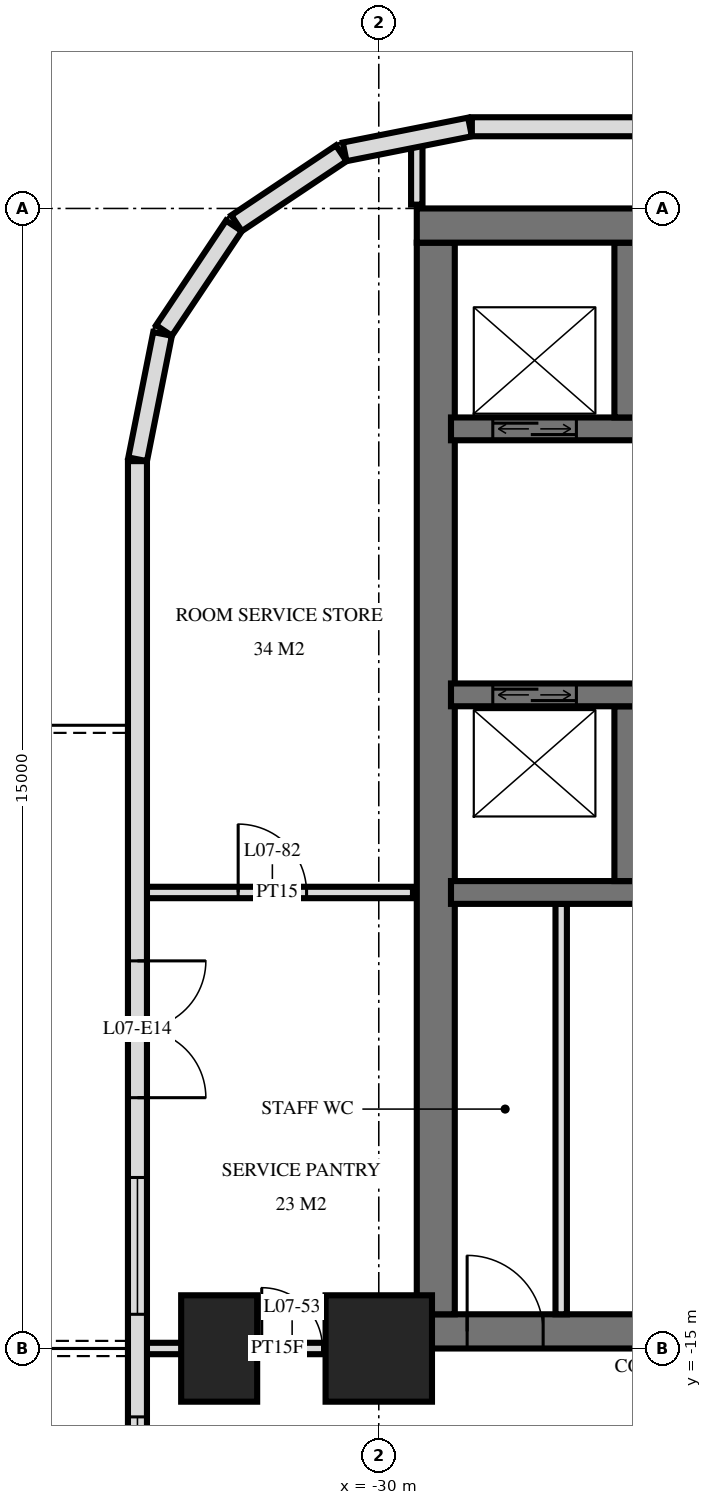
"""IFC4 building model, lengths in metres.
Left out: names, types, materials, properties, quantities, classifications, styles, units other than length and angle.
Written with IfcOpenShell. Run it as: python <this file> out.ifc"""

import sys

from ifc_helpers import new_model, si_unit, direction, frame, frame_2d, origin, origin_2d, place, context, subcontext, project, spatial, rectangle, extrude, element, fill, save


model = new_model("IFC4")
c1 = context("Model", 3, precision=1e-05, world=origin(), true_north=direction((0.0, 1.0)))
c2 = subcontext(c1, "Body", "Model", "MODEL_VIEW")
j1 = project(units=[si_unit("LENGTHUNIT", "METRE"), si_unit("PLANEANGLEUNIT", "RADIAN")], contexts=[c1])
p1 = place(None, origin())
s1 = spatial("IfcSite", under=j1, at=p1, CompositionType="ELEMENT")
p2 = place(p1, origin())
s2 = spatial("IfcBuilding", under=s1, at=p2, CompositionType="ELEMENT")
p3 = place(p2, frame((0.0, 0.0, 34.8)))
s3 = spatial("IfcBuildingStorey", under=s2, at=p3, CompositionType="ELEMENT", Elevation=34.8)
p4 = place(p3, frame((-32.1, -15.0, 0.0), z_axis=(0.0, 0.0, 1.0), x_axis=(0.0, 1.0, 0.0)))
e1 = element("IfcColumn", 1, at=p4, inside=s3, PredefinedType="COLUMN", context=c2, shape_type="SweptSolid", body=[
    extrude(rectangle(XDim=1.4, YDim=1.0, at=origin_2d()), origin(), (0.0, 0.0, 1.0), 3.6),
])
p5 = place(p3, frame((-30.0, -15.0, 0.0), z_axis=(0.0, 0.0, 1.0), x_axis=(1.0, 0.0, 0.0)))
e2 = element("IfcColumn", 2, at=p5, inside=s3, PredefinedType="COLUMN", context=c2, shape_type="SweptSolid", body=[
    extrude(rectangle(XDim=1.4, YDim=1.4, at=origin_2d()), origin(), (0.0, 0.0, 1.0), 3.6),
])
p6 = place(p3, frame((-29.5, -0.225, 0.0), z_axis=(0.0, 0.0, 1.0), x_axis=(1.0, 0.0, 0.0)))
e3 = element("IfcWall", 3, at=p6, inside=s3, PredefinedType="SHEAR", context=c2, shape_type="SweptSolid", body=[
    extrude(rectangle(XDim=19.5, YDim=0.45, at=frame_2d((9.75, 0.0))), origin(), (0.0, 0.0, 1.0), 3.6),
])
p7 = place(p3, frame((-29.5, -14.775, 0.0), z_axis=(0.0, 0.0, 1.0), x_axis=(1.0, 0.0, 0.0)))
e4 = element("IfcWall", 4, at=p7, inside=s3, PredefinedType="SHEAR", context=c2, shape_type="SweptSolid", body=[
    extrude(rectangle(XDim=19.5, YDim=0.45, at=frame_2d((9.75, 0.0))), origin(), (0.0, 0.0, 1.0), 3.6),
])
p8 = place(p7, frame((11.2, 0.0, 0.0)))
e5 = element("IfcOpeningElement", 5, at=p8, cuts=e4, PredefinedType="OPENING", context=c2, shape_type="SweptSolid", body=[
    extrude(rectangle(XDim=1.2, YDim=2.1, at=frame_2d((0.6, 1.05))), frame((0.0, 0.235, 0.0), z_axis=(0.0, -1.0, 0.0), x_axis=(1.0, 0.0, 0.0)), (0.0, 0.0, 1.0), 0.47),
])
p9 = place(p7, frame((14.25, 0.0, 0.0)))
e6 = element("IfcOpeningElement", 6, at=p9, cuts=e4, PredefinedType="OPENING", context=c2, shape_type="SweptSolid", body=[
    extrude(rectangle(XDim=1.1, YDim=2.1, at=frame_2d((0.55, 1.05))), frame((0.0, 0.235, 0.0), z_axis=(0.0, -1.0, 0.0), x_axis=(1.0, 0.0, 0.0)), (0.0, 0.0, 1.0), 0.47),
])
p10 = place(p7, frame((8.5, 0.0, 0.0)))
e7 = element("IfcOpeningElement", 7, at=p10, cuts=e4, PredefinedType="OPENING", context=c2, shape_type="SweptSolid", body=[
    extrude(rectangle(XDim=0.9, YDim=2.1, at=frame_2d((0.45, 1.05))), frame((0.0, 0.235, 0.0), z_axis=(0.0, -1.0, 0.0), x_axis=(1.0, 0.0, 0.0)), (0.0, 0.0, 1.0), 0.47),
])
p11 = place(p7, frame((6.05, 0.0, 0.0)))
e8 = element("IfcOpeningElement", 8, at=p11, cuts=e4, PredefinedType="OPENING", context=c2, shape_type="SweptSolid", body=[
    extrude(rectangle(XDim=1.0, YDim=2.1, at=frame_2d((0.5, 1.05))), frame((0.0, 0.235, 0.0), z_axis=(0.0, -1.0, 0.0), x_axis=(1.0, 0.0, 0.0)), (0.0, 0.0, 1.0), 0.47),
])
p12 = place(p7, frame((2.988, 0.0, 0.0)))
e9 = element("IfcOpeningElement", 9, at=p12, cuts=e4, PredefinedType="OPENING", context=c2, shape_type="SweptSolid", body=[
    extrude(rectangle(XDim=1.0, YDim=2.1, at=frame_2d((0.5, 1.05))), frame((0.0, 0.235, 0.0), z_axis=(0.0, -1.0, 0.0), x_axis=(1.0, 0.0, 0.0)), (0.0, 0.0, 1.0), 0.47),
])
p13 = place(p7, frame((0.663, 0.0, 0.0)))
e10 = element("IfcOpeningElement", 10, at=p13, cuts=e4, PredefinedType="OPENING", context=c2, shape_type="SweptSolid", body=[
    extrude(rectangle(XDim=1.0, YDim=2.1, at=frame_2d((0.5, 1.05))), frame((0.0, 0.235, 0.0), z_axis=(0.0, -1.0, 0.0), x_axis=(1.0, 0.0, 0.0)), (0.0, 0.0, 1.0), 0.47),
])
p14 = place(p3, frame((-29.25, -14.55, 0.0), z_axis=(0.0, 0.0, 1.0), x_axis=(0.0, 1.0, 0.0)))
e11 = element("IfcWall", 11, at=p14, inside=s3, PredefinedType="SHEAR", context=c2, shape_type="SweptSolid", body=[
    extrude(rectangle(XDim=14.1, YDim=0.5, at=frame_2d((7.05, 0.0))), origin(), (0.0, 0.0, 1.0), 3.6),
])
p15 = place(p3, frame((-29.05, -2.9, 0.0), z_axis=(0.0, 0.0, 1.0), x_axis=(1.0, 0.0, 0.0)))
e12 = element("IfcWall", 12, at=p15, inside=s3, PredefinedType="SHEAR", context=c2, shape_type="SweptSolid", body=[
    extrude(rectangle(XDim=18.7, YDim=0.3, at=frame_2d((9.35, 0.0))), origin(), (0.0, 0.0, 1.0), 3.6),
])
p16 = place(p15, frame((2.95, 0.0, 0.0)))
e13 = element("IfcOpeningElement", 13, at=p16, cuts=e12, PredefinedType="OPENING", context=c2, shape_type="SweptSolid", body=[
    extrude(rectangle(XDim=1.1, YDim=2.1, at=frame_2d((0.55, 1.05))), frame((0.0, 0.16, 0.0), z_axis=(0.0, -1.0, 0.0), x_axis=(1.0, 0.0, 0.0)), (0.0, 0.0, 1.0), 0.32),
])
p17 = place(p15, frame((0.55, 0.0, 0.0)))
e14 = element("IfcOpeningElement", 14, at=p17, cuts=e12, PredefinedType="OPENING", context=c2, shape_type="SweptSolid", body=[
    extrude(rectangle(XDim=1.1, YDim=2.1, at=frame_2d((0.55, 1.05))), frame((0.0, 0.16, 0.0), z_axis=(0.0, -1.0, 0.0), x_axis=(1.0, 0.0, 0.0)), (0.0, 0.0, 1.0), 0.32),
])
p18 = place(p15, frame((11.863, 0.0, 0.0)))
e15 = element("IfcOpeningElement", 15, at=p18, cuts=e12, PredefinedType="OPENING", context=c2, shape_type="SweptSolid", body=[
    extrude(rectangle(XDim=0.9, YDim=2.1, at=frame_2d((0.45, 1.05))), frame((0.0, 0.16, 0.0), z_axis=(0.0, -1.0, 0.0), x_axis=(1.0, 0.0, 0.0)), (0.0, 0.0, 1.0), 0.32),
])
p19 = place(p15, frame((10.438, 0.0, 0.0)))
e16 = element("IfcOpeningElement", 16, at=p19, cuts=e12, PredefinedType="OPENING", context=c2, shape_type="SweptSolid", body=[
    extrude(rectangle(XDim=0.9, YDim=2.1, at=frame_2d((0.45, 1.05))), frame((0.0, 0.16, 0.0), z_axis=(0.0, -1.0, 0.0), x_axis=(1.0, 0.0, 0.0)), (0.0, 0.0, 1.0), 0.32),
])
p20 = place(p15, frame((16.85, 0.0, 0.0)))
e17 = element("IfcOpeningElement", 17, at=p20, cuts=e12, PredefinedType="OPENING", context=c2, shape_type="SweptSolid", body=[
    extrude(rectangle(XDim=1.0, YDim=2.1, at=frame_2d((0.5, 1.05))), frame((0.0, 0.16, 0.0), z_axis=(0.0, -1.0, 0.0), x_axis=(1.0, 0.0, 0.0)), (0.0, 0.0, 1.0), 0.32),
])
p21 = place(p15, frame((14.562, 0.0, 0.0)))
e18 = element("IfcOpeningElement", 18, at=p21, cuts=e12, PredefinedType="OPENING", context=c2, shape_type="SweptSolid", body=[
    extrude(rectangle(XDim=1.0, YDim=2.1, at=frame_2d((0.5, 1.05))), frame((0.0, 0.16, 0.0), z_axis=(0.0, -1.0, 0.0), x_axis=(1.0, 0.0, 0.0)), (0.0, 0.0, 1.0), 0.32),
])
p22 = place(p15, frame((13.137, 0.0, 0.0)))
e19 = element("IfcOpeningElement", 19, at=p22, cuts=e12, PredefinedType="OPENING", context=c2, shape_type="SweptSolid", body=[
    extrude(rectangle(XDim=1.0, YDim=2.1, at=frame_2d((0.5, 1.05))), frame((0.0, 0.16, 0.0), z_axis=(0.0, -1.0, 0.0), x_axis=(1.0, 0.0, 0.0)), (0.0, 0.0, 1.0), 0.32),
])
p23 = place(p15, frame((5.6, 0.0, 0.0)))
e20 = element("IfcOpeningElement", 20, at=p23, cuts=e12, PredefinedType="OPENING", context=c2, shape_type="SweptSolid", body=[
    extrude(rectangle(XDim=1.0, YDim=2.1, at=frame_2d((0.5, 1.05))), frame((0.0, 0.16, 0.0), z_axis=(0.0, -1.0, 0.0), x_axis=(1.0, 0.0, 0.0)), (0.0, 0.0, 1.0), 0.32),
])
p24 = place(p3, frame((-29.05, -6.4, 0.0), z_axis=(0.0, 0.0, 1.0), x_axis=(1.0, 0.0, 0.0)))
e21 = element("IfcWall", 21, at=p24, inside=s3, PredefinedType="SHEAR", context=c2, shape_type="SweptSolid", body=[
    extrude(rectangle(XDim=18.7, YDim=0.3, at=frame_2d((9.35, 0.0))), origin(), (0.0, 0.0, 1.0), 3.6),
])
p25 = place(p24, frame((2.95, 0.0, 0.0)))
e22 = element("IfcOpeningElement", 22, at=p25, cuts=e21, PredefinedType="OPENING", context=c2, shape_type="SweptSolid", body=[
    extrude(rectangle(XDim=1.1, YDim=2.1, at=frame_2d((0.55, 1.05))), frame((0.0, 0.16, 0.0), z_axis=(0.0, -1.0, 0.0), x_axis=(1.0, 0.0, 0.0)), (0.0, 0.0, 1.0), 0.32),
])
p26 = place(p24, frame((0.55, 0.0, 0.0)))
e23 = element("IfcOpeningElement", 23, at=p26, cuts=e21, PredefinedType="OPENING", context=c2, shape_type="SweptSolid", body=[
    extrude(rectangle(XDim=1.1, YDim=2.1, at=frame_2d((0.55, 1.05))), frame((0.0, 0.16, 0.0), z_axis=(0.0, -1.0, 0.0), x_axis=(1.0, 0.0, 0.0)), (0.0, 0.0, 1.0), 0.32),
])
p27 = place(p24, frame((10.8, 0.0, 0.0)))
e24 = element("IfcOpeningElement", 24, at=p27, cuts=e21, PredefinedType="OPENING", context=c2, shape_type="SweptSolid", body=[
    extrude(rectangle(XDim=1.1, YDim=2.1, at=frame_2d((0.55, 1.05))), frame((0.0, 0.16, 0.0), z_axis=(0.0, -1.0, 0.0), x_axis=(1.0, 0.0, 0.0)), (0.0, 0.0, 1.0), 0.32),
])
p28 = place(p24, frame((5.6, 0.0, 0.0)))
e25 = element("IfcOpeningElement", 25, at=p28, cuts=e21, PredefinedType="OPENING", context=c2, shape_type="SweptSolid", body=[
    extrude(rectangle(XDim=1.0, YDim=2.1, at=frame_2d((0.5, 1.05))), frame((0.0, 0.16, 0.0), z_axis=(0.0, -1.0, 0.0), x_axis=(1.0, 0.0, 0.0)), (0.0, 0.0, 1.0), 0.32),
])
p29 = place(p3, frame((-29.05, -9.0, 0.0), z_axis=(0.0, 0.0, 1.0), x_axis=(1.0, 0.0, 0.0)))
e26 = element("IfcWall", 26, at=p29, inside=s3, PredefinedType="SHEAR", context=c2, shape_type="SweptSolid", body=[
    extrude(rectangle(XDim=18.7, YDim=0.3, at=frame_2d((9.35, 0.0))), origin(), (0.0, 0.0, 1.0), 3.6),
])
p30 = place(p29, frame((13.8, 0.0, 0.0)))
e27 = element("IfcOpeningElement", 27, at=p30, cuts=e26, PredefinedType="OPENING", context=c2, shape_type="SweptSolid", body=[
    extrude(rectangle(XDim=1.1, YDim=2.1, at=frame_2d((0.55, 1.05))), frame((0.0, 0.16, 0.0), z_axis=(0.0, -1.0, 0.0), x_axis=(1.0, 0.0, 0.0)), (0.0, 0.0, 1.0), 0.32),
])
for number, where, z_axis, x_axis in (
    (28, (-26.75, -2.75, 0.0), (0.0, 0.0, 1.0), (0.0, 1.0, 0.0)),
    (29, (-26.75, -8.85, 0.0), (0.0, 0.0, 1.0), (0.0, 1.0, 0.0)),
):
    element("IfcWall", number, at=place(p3, frame(where, z_axis=z_axis, x_axis=x_axis)), inside=s3, PredefinedType="SHEAR", context=c2, shape_type="SweptSolid", body=[
        extrude(rectangle(XDim=2.3, YDim=0.3, at=frame_2d((1.15, 0.0))), origin(), (0.0, 0.0, 1.0), 3.6),
    ])
p31 = place(p3, frame((28.775, 1.075, 0.0), z_axis=(0.0, 0.0, 1.0), x_axis=(-1.0, 0.0, 0.0)))
e30 = element("IfcWall", 30, at=p31, inside=s3, PredefinedType="SOLIDWALL", context=c2, shape_type="SweptSolid", body=[
    extrude(rectangle(XDim=57.551, YDim=0.25, at=frame_2d((28.775, 0.0))), origin(), (0.0, 0.0, 1.0), 3.32),
])
p32 = place(p31, frame((24.275, 0.0, 0.3)))
e31 = element("IfcOpeningElement", 31, at=p32, cuts=e30, PredefinedType="OPENING", context=c2, shape_type="SweptSolid", body=[
    extrude(rectangle(XDim=2.4, YDim=2.1, at=frame_2d((1.2, 1.05))), frame((0.0, 0.135, 0.0), z_axis=(0.0, -1.0, 0.0), x_axis=(1.0, 0.0, 0.0)), (0.0, 0.0, 1.0), 0.27),
])
p33 = place(p31, frame((35.325, 0.0, 0.3)))
e32 = element("IfcOpeningElement", 32, at=p33, cuts=e30, PredefinedType="OPENING", context=c2, shape_type="SweptSolid", body=[
    extrude(rectangle(XDim=2.4, YDim=2.1, at=frame_2d((1.2, 1.05))), frame((0.0, 0.135, 0.0), z_axis=(0.0, -1.0, 0.0), x_axis=(1.0, 0.0, 0.0)), (0.0, 0.0, 1.0), 0.27),
])
p34 = place(p3, frame((-28.8, 1.073, 0.0), z_axis=(0.0, 0.0, 1.0), x_axis=(-0.980803419081, -0.194999110559, 0.0)))
e33 = element("IfcWall", 33, at=p34, inside=s3, PredefinedType="SOLIDWALL", context=c2, shape_type="SweptSolid", body=[
    extrude(rectangle(XDim=1.681, YDim=0.25, at=frame_2d((0.841, 0.0))), origin(), (0.0, 0.0, 1.0), 3.32),
])
for number, where, z_axis, x_axis in (
    (34, (-30.494, 0.726, 0.0), (0.0, 0.0, 1.0), (-0.831, -0.556, 0.0)),
    (35, (-31.906, -0.229, 0.0), (0.0, 0.0, 1.0), (-0.556, -0.831, 0.0)),
):
    element("IfcWall", number, at=place(p3, frame(where, z_axis=z_axis, x_axis=x_axis)), inside=s3, PredefinedType="SOLIDWALL", context=c2, shape_type="SweptSolid", body=[
        extrude(rectangle(XDim=1.656, YDim=0.25, at=frame_2d((0.828, 0.0))), origin(), (0.0, 0.0, 1.0), 3.32),
    ])
p35 = place(p3, frame((-32.844, -1.651, 0.0), z_axis=(0.0, 0.0, 1.0), x_axis=(-0.19513878023, -0.980775640221, 0.0)))
e36 = element("IfcWall", 36, at=p35, inside=s3, PredefinedType="SOLIDWALL", context=c2, shape_type="SweptSolid", body=[
    extrude(rectangle(XDim=1.681, YDim=0.25, at=frame_2d((0.841, 0.0))), origin(), (0.0, 0.0, 1.0), 3.32),
])
p36 = place(p3, frame((-33.175, -3.325, 0.0), z_axis=(0.0, 0.0, 1.0), x_axis=(0.0, -1.0, 0.0)))
e37 = element("IfcWall", 37, at=p36, inside=s3, PredefinedType="SOLIDWALL", context=c2, shape_type="SweptSolid", body=[
    extrude(rectangle(XDim=21.551, YDim=0.25, at=frame_2d((10.775, 0.0))), origin(), (0.0, 0.0, 1.0), 3.32),
])
p37 = place(p36, frame((6.575, 0.0, 0.0)))
e38 = element("IfcOpeningElement", 38, at=p37, cuts=e37, PredefinedType="OPENING", context=c2, shape_type="SweptSolid", body=[
    extrude(rectangle(XDim=1.8, YDim=2.4, at=frame_2d((0.9, 1.2))), frame((0.0, 0.135, 0.0), z_axis=(0.0, -1.0, 0.0), x_axis=(1.0, 0.0, 0.0)), (0.0, 0.0, 1.0), 0.27),
])
p38 = place(p36, frame((9.425, 0.0, 0.3)))
e39 = element("IfcOpeningElement", 39, at=p38, cuts=e37, PredefinedType="OPENING", context=c2, shape_type="SweptSolid", body=[
    extrude(rectangle(XDim=1.8, YDim=2.1, at=frame_2d((0.9, 1.05))), frame((0.0, 0.135, 0.0), z_axis=(0.0, -1.0, 0.0), x_axis=(1.0, 0.0, 0.0)), (0.0, 0.0, 1.0), 0.27),
])
p39 = place(p36, frame((12.575, 0.0, 0.3)))
e40 = element("IfcOpeningElement", 40, at=p39, cuts=e37, PredefinedType="OPENING", context=c2, shape_type="SweptSolid", body=[
    extrude(rectangle(XDim=1.2, YDim=2.1, at=frame_2d((0.6, 1.05))), frame((0.0, 0.135, 0.0), z_axis=(0.0, -1.0, 0.0), x_axis=(1.0, 0.0, 0.0)), (0.0, 0.0, 1.0), 0.27),
])
p40 = place(p36, frame((15.6, 0.0, 0.0)))
e41 = element("IfcOpeningElement", 41, at=p40, cuts=e37, PredefinedType="OPENING", context=c2, shape_type="SweptSolid", body=[
    extrude(rectangle(XDim=1.8, YDim=2.4, at=frame_2d((0.9, 1.2))), frame((0.0, 0.135, 0.0), z_axis=(0.0, -1.0, 0.0), x_axis=(1.0, 0.0, 0.0)), (0.0, 0.0, 1.0), 0.27),
])
p41 = place(p36, frame((19.275, 0.0, 0.0)))
e42 = element("IfcOpeningElement", 42, at=p41, cuts=e37, PredefinedType="OPENING", context=c2, shape_type="SweptSolid", body=[
    extrude(rectangle(XDim=1.8, YDim=2.4, at=frame_2d((0.9, 1.2))), frame((0.0, 0.135, 0.0), z_axis=(0.0, -1.0, 0.0), x_axis=(1.0, 0.0, 0.0)), (0.0, 0.0, 1.0), 0.27),
])
p42 = place(p3, frame((-27.6, -14.55, 0.0), z_axis=(0.0, 0.0, 1.0), x_axis=(0.0, 1.0, 0.0)))
e43 = element("IfcWall", 43, at=p42, inside=s3, PredefinedType="PARTITIONING", context=c2, shape_type="SweptSolid", body=[
    extrude(rectangle(XDim=5.4, YDim=0.15, at=frame_2d((2.7, 0.0))), origin(), (0.0, 0.0, 1.0), 3.3),
])
p43 = place(p3, frame((-29.5, 0.05, 0.0), z_axis=(0.0, 0.0, 1.0), x_axis=(0.0, 1.0, 0.0)))
e44 = element("IfcWall", 44, at=p43, inside=s3, PredefinedType="PARTITIONING", context=c2, shape_type="SweptSolid", body=[
    extrude(rectangle(XDim=0.827, YDim=0.15, at=frame_2d((0.414, 0.0))), origin(), (0.0, 0.0, 1.0), 3.32),
])
p44 = place(p3, frame((-33.12, -15.0, 0.0), z_axis=(0.0, 0.0, 1.0), x_axis=(1.0, 0.0, 0.0)))
e45 = element("IfcWall", 45, at=p44, inside=s3, PredefinedType="PARTITIONING", context=c2, shape_type="SweptSolid", body=[
    extrude(rectangle(XDim=3.57, YDim=0.15, at=frame_2d((1.785, 0.0))), origin(), (0.0, 0.0, 1.0), 3.32),
])
p45 = place(p44, frame((1.58, 0.0, 0.0)))
e46 = element("IfcOpeningElement", 46, at=p45, cuts=e45, PredefinedType="OPENING", context=c2, shape_type="SweptSolid", body=[
    extrude(rectangle(XDim=0.8, YDim=2.1, at=frame_2d((0.4, 1.05))), frame((0.0, 0.085, 0.0), z_axis=(0.0, -1.0, 0.0), x_axis=(1.0, 0.0, 0.0)), (0.0, 0.0, 1.0), 0.17),
])
p46 = place(p3, frame((-33.12, -9.0, 0.0), z_axis=(0.0, 0.0, 1.0), x_axis=(1.0, 0.0, 0.0)))
e47 = element("IfcWall", 47, at=p46, inside=s3, PredefinedType="PARTITIONING", context=c2, shape_type="SweptSolid", body=[
    extrude(rectangle(XDim=3.57, YDim=0.15, at=frame_2d((1.785, 0.0))), origin(), (0.0, 0.0, 1.0), 3.32),
])
p47 = place(p46, frame((1.27, 0.0, 0.0)))
e48 = element("IfcOpeningElement", 48, at=p47, cuts=e47, PredefinedType="OPENING", context=c2, shape_type="SweptSolid", body=[
    extrude(rectangle(XDim=0.9, YDim=2.1, at=frame_2d((0.45, 1.05))), frame((0.0, 0.085, 0.0), z_axis=(0.0, -1.0, 0.0), x_axis=(1.0, 0.0, 0.0)), (0.0, 0.0, 1.0), 0.17),
])
p48 = place(p37, origin())
e49 = element("IfcDoor", 49, at=p48, inside=s3, OperationType="DOUBLE_DOOR_SINGLE_SWING", PredefinedType="DOOR", context=c2, shape_type="SweptSolid", body=[
    extrude(rectangle(XDim=1.8, YDim=2.4, at=frame_2d((0.9, 1.2))), frame((0.0, 0.025, 0.0), z_axis=(0.0, -1.0, 0.0), x_axis=(1.0, 0.0, 0.0)), (0.0, 0.0, 1.0), 0.05),
])
fill(e38, e49)
p49 = place(p38, origin())
e50 = element("IfcWindow", 50, at=p49, inside=s3, PartitioningType="SINGLE_PANEL", PredefinedType="WINDOW", context=c2, shape_type="SweptSolid", body=[
    extrude(rectangle(XDim=1.8, YDim=2.1, at=frame_2d((0.9, 1.05))), frame((0.0, 0.03, 0.0), z_axis=(0.0, -1.0, 0.0), x_axis=(1.0, 0.0, 0.0)), (0.0, 0.0, 1.0), 0.06),
])
fill(e39, e50)
p50 = place(p39, origin())
e51 = element("IfcWindow", 51, at=p50, inside=s3, PartitioningType="SINGLE_PANEL", PredefinedType="WINDOW", context=c2, shape_type="SweptSolid", body=[
    extrude(rectangle(XDim=1.2, YDim=2.1, at=frame_2d((0.6, 1.05))), frame((0.0, 0.03, 0.0), z_axis=(0.0, -1.0, 0.0), x_axis=(1.0, 0.0, 0.0)), (0.0, 0.0, 1.0), 0.06),
])
fill(e40, e51)
p51 = place(p17, origin())
e52 = element("IfcDoor", 52, at=p51, inside=s3, OperationType="DOUBLE_DOOR_SLIDING", PredefinedType="USERDEFINED", context=c2, shape_type="SweptSolid", body=[
    extrude(rectangle(XDim=1.1, YDim=2.1, at=frame_2d((0.55, 1.05))), frame((0.0, 0.025, 0.0), z_axis=(0.0, -1.0, 0.0), x_axis=(1.0, 0.0, 0.0)), (0.0, 0.0, 1.0), 0.05),
])
fill(e14, e52)
p52 = place(p26, origin())
e53 = element("IfcDoor", 53, at=p52, inside=s3, OperationType="DOUBLE_DOOR_SLIDING", PredefinedType="USERDEFINED", context=c2, shape_type="SweptSolid", body=[
    extrude(rectangle(XDim=1.1, YDim=2.1, at=frame_2d((0.55, 1.05))), frame((0.0, 0.025, 0.0), z_axis=(0.0, -1.0, 0.0), x_axis=(1.0, 0.0, 0.0)), (0.0, 0.0, 1.0), 0.05),
])
fill(e23, e53)
p53 = place(p13, origin())
e54 = element("IfcDoor", 54, at=p53, inside=s3, OperationType="SINGLE_SWING_RIGHT", PredefinedType="DOOR", context=c2, shape_type="SweptSolid", body=[
    extrude(rectangle(XDim=1.0, YDim=2.1, at=frame_2d((0.5, 1.05))), frame((0.0, 0.025, 0.0), z_axis=(0.0, -1.0, 0.0), x_axis=(1.0, 0.0, 0.0)), (0.0, 0.0, 1.0), 0.05),
])
fill(e10, e54)
p54 = place(p45, origin())
e55 = element("IfcDoor", 55, at=p54, inside=s3, OperationType="SINGLE_SWING_RIGHT", PredefinedType="DOOR", context=c2, shape_type="SweptSolid", body=[
    extrude(rectangle(XDim=0.8, YDim=2.1, at=frame_2d((0.4, 1.05))), frame((0.0, 0.025, 0.0), z_axis=(0.0, -1.0, 0.0), x_axis=(1.0, 0.0, 0.0)), (0.0, 0.0, 1.0), 0.05),
])
fill(e46, e55)
p55 = place(p47, origin())
e56 = element("IfcDoor", 56, at=p55, inside=s3, OperationType="SINGLE_SWING_RIGHT", PredefinedType="DOOR", context=c2, shape_type="SweptSolid", body=[
    extrude(rectangle(XDim=0.9, YDim=2.1, at=frame_2d((0.45, 1.05))), frame((0.0, 0.025, 0.0), z_axis=(0.0, -1.0, 0.0), x_axis=(1.0, 0.0, 0.0)), (0.0, 0.0, 1.0), 0.05),
])
fill(e48, e56)
save(model, sys.argv[1])
